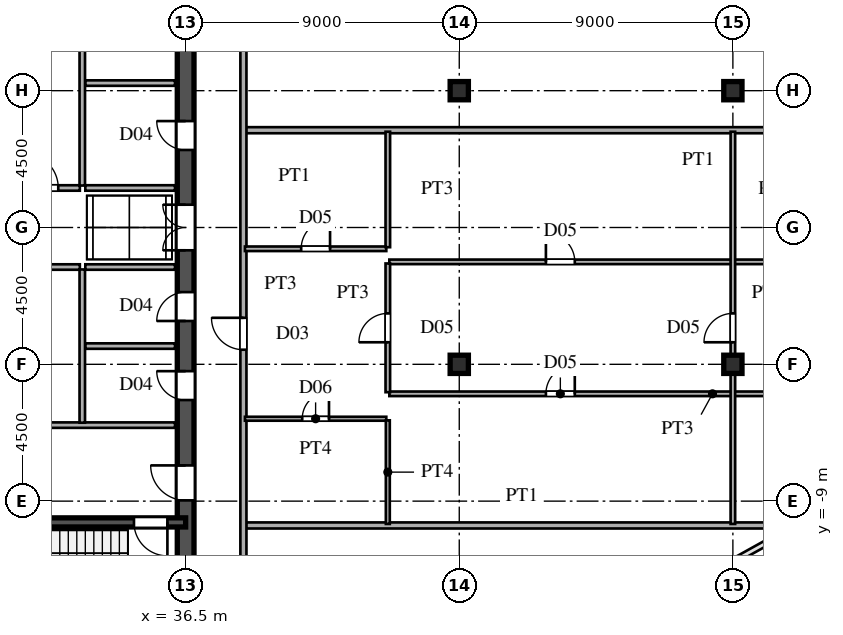
"""IFC4 building model, lengths in metres.
Left out: names, types, materials, properties, quantities, classifications, styles, units other than length and angle.
Written with IfcOpenShell. Run it as: python <this file> out.ifc"""

import sys

from ifc_helpers import new_model, si_unit, direction, frame, frame_2d, origin, origin_2d, place, context, subcontext, project, spatial, rectangle, i_section, extrude, source, transform, mapped, element, fill, save


model = new_model("IFC4")
c1 = context("Model", 3, precision=1e-05, world=origin(), true_north=direction((0.0, 1.0)))
c2 = subcontext(c1, "Body", "Model", "MODEL_VIEW")
j1 = project(units=[si_unit("LENGTHUNIT", "METRE"), si_unit("PLANEANGLEUNIT", "RADIAN")], contexts=[c1])
p1 = place(None, origin())
s1 = spatial("IfcSite", under=j1, at=p1, CompositionType="ELEMENT")
p2 = place(p1, origin())
s2 = spatial("IfcBuilding", under=s1, at=p2, CompositionType="ELEMENT")
p3 = place(p2, frame((0.0, 0.0, 192.3)))
s3 = spatial("IfcBuildingStorey", under=s2, at=p3, CompositionType="ELEMENT", Elevation=192.3)
m1 = source(origin(), c2, "Body", "SweptSolid", [
    extrude(i_section(OverallWidth=0.6, OverallDepth=0.6, WebThickness=0.025, FlangeThickness=0.04, at=origin_2d()), origin(), (0.0, 0.0, 1.0), 3.6),
])
for number, where, z_axis, x_axis in (
    (1, (45.5, -4.5, 0.0), (0.0, 0.0, 1.0), (1.0, 0.0, 0.0)),
    (2, (45.5, 4.5, 0.0), (0.0, 0.0, 1.0), (1.0, 0.0, 0.0)),
    (3, (54.5, -4.5, 0.0), (0.0, 0.0, 1.0), (1.0, 0.0, 0.0)),
    (4, (54.5, 4.5, 0.0), (0.0, 0.0, 1.0), (1.0, 0.0, 0.0)),
):
    element("IfcColumn", number, at=place(p3, frame(where, z_axis=z_axis, x_axis=x_axis)), inside=s3, PredefinedType="COLUMN", context=c2, shape_type="MappedRepresentation", body=[
        mapped(m1, transform((0.0, 0.0, 0.0), scale=1.0)),
    ])
p4 = place(p3, frame((36.5, -13.65, 0.0), z_axis=(0.0, 0.0, 1.0), x_axis=(0.0, 1.0, 0.0)))
e5 = element("IfcWall", 5, at=p4, inside=s3, PredefinedType="SHEAR", context=c2, shape_type="SweptSolid", body=[
    extrude(rectangle(XDim=7.15, YDim=0.55, at=frame_2d((3.575, 0.0))), origin(), (0.0, 0.0, 1.0), 3.38),
])
p5 = place(p4, frame((4.675, 0.0, 0.0)))
e6 = element("IfcOpeningElement", 6, at=p5, cuts=e5, PredefinedType="OPENING", context=c2, shape_type="SweptSolid", body=[
    extrude(rectangle(XDim=1.15, YDim=2.2, at=frame_2d((0.575, 1.1))), frame((0.0, 0.285, 0.0), z_axis=(0.0, -1.0, 0.0), x_axis=(1.0, 0.0, 0.0)), (0.0, 0.0, 1.0), 0.57),
])
p6 = place(p3, frame((36.5, -1.3, 0.0), z_axis=(0.0, 0.0, 1.0), x_axis=(0.0, 1.0, 0.0)))
e7 = element("IfcWall", 7, at=p6, inside=s3, PredefinedType="SHEAR", context=c2, shape_type="SweptSolid", body=[
    extrude(rectangle(XDim=2.6, YDim=0.55, at=frame_2d((1.3, 0.0))), origin(), (0.0, 0.0, 1.0), 3.38),
])
p7 = place(p6, frame((0.55, 0.0, 0.0)))
e8 = element("IfcOpeningElement", 8, at=p7, cuts=e7, PredefinedType="OPENING", context=c2, shape_type="SweptSolid", body=[
    extrude(rectangle(XDim=1.5, YDim=2.3, at=frame_2d((0.75, 1.15))), frame((0.0, 0.285, 0.0), z_axis=(0.0, -1.0, 0.0), x_axis=(1.0, 0.0, 0.0)), (0.0, 0.0, 1.0), 0.57),
])
p8 = place(p3, frame((36.5, -6.5, 0.0), z_axis=(0.0, 0.0, 1.0), x_axis=(0.0, 1.0, 0.0)))
e9 = element("IfcWall", 9, at=p8, inside=s3, PredefinedType="SHEAR", context=c2, shape_type="SweptSolid", body=[
    extrude(rectangle(XDim=2.6, YDim=0.55, at=frame_2d((1.3, 0.0))), origin(), (0.0, 0.0, 1.0), 3.38),
])
p9 = place(p8, frame((0.825, 0.0, 0.0)))
e10 = element("IfcOpeningElement", 10, at=p9, cuts=e9, PredefinedType="OPENING", context=c2, shape_type="SweptSolid", body=[
    extrude(rectangle(XDim=0.95, YDim=2.15, at=frame_2d((0.475, 1.075))), frame((0.0, 0.285, 0.0), z_axis=(0.0, -1.0, 0.0), x_axis=(1.0, 0.0, 0.0)), (0.0, 0.0, 1.0), 0.57),
])
p10 = place(p3, frame((36.5, -3.9, 0.0), z_axis=(0.0, 0.0, 1.0), x_axis=(0.0, 1.0, 0.0)))
e11 = element("IfcWall", 11, at=p10, inside=s3, PredefinedType="SHEAR", context=c2, shape_type="SweptSolid", body=[
    extrude(rectangle(XDim=2.6, YDim=0.55, at=frame_2d((1.3, 0.0))), origin(), (0.0, 0.0, 1.0), 3.38),
])
p11 = place(p10, frame((0.825, 0.0, 0.0)))
e12 = element("IfcOpeningElement", 12, at=p11, cuts=e11, PredefinedType="OPENING", context=c2, shape_type="SweptSolid", body=[
    extrude(rectangle(XDim=0.95, YDim=2.15, at=frame_2d((0.475, 1.075))), frame((0.0, 0.285, 0.0), z_axis=(0.0, -1.0, 0.0), x_axis=(1.0, 0.0, 0.0)), (0.0, 0.0, 1.0), 0.57),
])
p12 = place(p3, frame((36.5, 1.3, 0.0), z_axis=(0.0, 0.0, 1.0), x_axis=(0.0, 1.0, 0.0)))
e13 = element("IfcWall", 13, at=p12, inside=s3, PredefinedType="SHEAR", context=c2, shape_type="SweptSolid", body=[
    extrude(rectangle(XDim=3.45, YDim=0.55, at=frame_2d((1.725, 0.0))), origin(), (0.0, 0.0, 1.0), 3.38),
])
p13 = place(p12, frame((1.25, 0.0, 0.0)))
e14 = element("IfcOpeningElement", 14, at=p13, cuts=e13, PredefinedType="OPENING", context=c2, shape_type="SweptSolid", body=[
    extrude(rectangle(XDim=0.95, YDim=2.15, at=frame_2d((0.475, 1.075))), frame((0.0, 0.285, 0.0), z_axis=(0.0, -1.0, 0.0), x_axis=(1.0, 0.0, 0.0)), (0.0, 0.0, 1.0), 0.57),
])
p14 = place(p3, frame((36.5, 4.75, 0.0), z_axis=(0.0, 0.0, 1.0), x_axis=(0.0, 1.0, 0.0)))
e15 = element("IfcWall", 15, at=p14, inside=s3, PredefinedType="SHEAR", context=c2, shape_type="SweptSolid", body=[
    extrude(rectangle(XDim=3.45, YDim=0.55, at=frame_2d((1.725, 0.0))), origin(), (0.0, 0.0, 1.0), 3.38),
])
p15 = place(p14, frame((1.25, 0.0, 0.0)))
e16 = element("IfcOpeningElement", 16, at=p15, cuts=e15, PredefinedType="OPENING", context=c2, shape_type="SweptSolid", body=[
    extrude(rectangle(XDim=0.95, YDim=2.15, at=frame_2d((0.475, 1.075))), frame((0.0, 0.285, 0.0), z_axis=(0.0, -1.0, 0.0), x_axis=(1.0, 0.0, 0.0)), (0.0, 0.0, 1.0), 0.57),
])
p16 = place(p3, frame((27.5, -9.7, 0.0), z_axis=(0.0, 0.0, 1.0), x_axis=(1.0, 0.0, 0.0)))
e17 = element("IfcWall", 17, at=p16, inside=s3, PredefinedType="SHEAR", context=c2, shape_type="SweptSolid", body=[
    extrude(rectangle(XDim=9.0, YDim=0.3, at=frame_2d((4.5, 0.0))), origin(), (0.0, 0.0, 1.0), 3.38),
])
p17 = place(p16, frame((7.3, 0.0, 0.0)))
e18 = element("IfcOpeningElement", 18, at=p17, cuts=e17, PredefinedType="OPENING", context=c2, shape_type="SweptSolid", body=[
    extrude(rectangle(XDim=1.1, YDim=2.2, at=frame_2d((0.55, 1.1))), frame((0.0, 0.16, 0.0), z_axis=(0.0, -1.0, 0.0), x_axis=(1.0, 0.0, 0.0)), (0.0, 0.0, 1.0), 0.32),
])
p18 = place(p3, frame((30.45, -6.5, 0.0), z_axis=(0.0, 0.0, 1.0), x_axis=(1.0, 0.0, 0.0)))
e19 = element("IfcWall", 19, at=p18, inside=s3, PredefinedType="PARTITIONING", context=c2, shape_type="SweptSolid", body=[
    extrude(rectangle(XDim=5.7, YDim=0.18, at=frame_2d((2.85, 0.0))), origin(), (0.0, 0.0, 1.0), 3.38),
])
p19 = place(p3, frame((33.1, -6.42, 0.0), z_axis=(0.0, 0.0, 1.0), x_axis=(0.0, 1.0, 0.0)))
e20 = element("IfcWall", 20, at=p19, inside=s3, PredefinedType="PARTITIONING", context=c2, shape_type="SweptSolid", body=[
    extrude(rectangle(XDim=5.04, YDim=0.18, at=frame_2d((2.52, 0.0))), origin(), (0.0, 0.0, 1.0), 3.38),
])
p20 = place(p3, frame((33.1, 1.38, 0.0), z_axis=(0.0, 0.0, 1.0), x_axis=(0.0, 1.0, 0.0)))
e21 = element("IfcWall", 21, at=p20, inside=s3, PredefinedType="PARTITIONING", context=c2, shape_type="SweptSolid", body=[
    extrude(rectangle(XDim=6.74, YDim=0.18, at=frame_2d((3.37, 0.0))), origin(), (0.0, 0.0, 1.0), 3.38),
])
p21 = place(p3, frame((30.3, -1.3, 0.0), z_axis=(0.0, 0.0, 1.0), x_axis=(1.0, 0.0, 0.0)))
e22 = element("IfcWall", 22, at=p21, inside=s3, PredefinedType="PARTITIONING", context=c2, shape_type="SweptSolid", body=[
    extrude(rectangle(XDim=2.72, YDim=0.18, at=frame_2d((1.36, 0.0))), origin(), (0.0, 0.0, 1.0), 3.38),
])
p22 = place(p21, frame((0.21, 0.0, 0.0)))
e23 = element("IfcOpeningElement", 23, at=p22, cuts=e22, PredefinedType="OPENING", context=c2, shape_type="SweptSolid", body=[
    extrude(rectangle(XDim=1.15, YDim=2.2, at=frame_2d((0.575, 1.1))), frame((0.0, 0.1, 0.0), z_axis=(0.0, -1.0, 0.0), x_axis=(1.0, 0.0, 0.0)), (0.0, 0.0, 1.0), 0.2),
])
p23 = place(p3, frame((30.45, 1.3, 0.0), z_axis=(0.0, 0.0, 1.0), x_axis=(1.0, 0.0, 0.0)))
e24 = element("IfcWall", 24, at=p23, inside=s3, PredefinedType="PARTITIONING", context=c2, shape_type="SweptSolid", body=[
    extrude(rectangle(XDim=2.57, YDim=0.18, at=frame_2d((1.285, 0.0))), origin(), (0.0, 0.0, 1.0), 3.38),
])
p24 = place(p23, frame((0.71, 0.0, 0.0)))
e25 = element("IfcOpeningElement", 25, at=p24, cuts=e24, PredefinedType="OPENING", context=c2, shape_type="SweptSolid", body=[
    extrude(rectangle(XDim=1.15, YDim=2.2, at=frame_2d((0.575, 1.1))), frame((0.0, 0.1, 0.0), z_axis=(0.0, -1.0, 0.0), x_axis=(1.0, 0.0, 0.0)), (0.0, 0.0, 1.0), 0.2),
])
for number, where, z_axis, x_axis in (
    (26, (33.2, -1.3, 0.0), (0.0, 0.0, 1.0), (1.0, 0.0, 0.0)),
    (27, (33.2, 1.3, 0.0), (0.0, 0.0, 1.0), (1.0, 0.0, 0.0)),
    (28, (33.2, -3.9, 0.0), (0.0, 0.0, 1.0), (1.0, 0.0, 0.0)),
    (29, (33.2, 4.75, 0.0), (0.0, 0.0, 1.0), (1.0, 0.0, 0.0)),
):
    element("IfcWall", number, at=place(p3, frame(where, z_axis=z_axis, x_axis=x_axis)), inside=s3, PredefinedType="PARTITIONING", context=c2, shape_type="SweptSolid", body=[
        extrude(rectangle(XDim=2.95, YDim=0.18, at=frame_2d((1.475, 0.0))), origin(), (0.0, 0.0, 1.0), 3.38),
    ])
p25 = place(p3, frame((38.48, -9.8, 0.0), z_axis=(0.0, 0.0, 1.0), x_axis=(1.0, 0.0, 0.0)))
e30 = element("IfcWall", 30, at=p25, inside=s3, PredefinedType="PARTITIONING", context=c2, shape_type="SweptSolid", body=[
    extrude(rectangle(XDim=18.163, YDim=0.2, at=frame_2d((9.082, 0.0))), origin(), (0.0, 0.0, 1.0), 3.38),
])
p26 = place(p3, frame((38.45, -6.29, 0.0), z_axis=(0.0, 0.0, 1.0), x_axis=(1.0, 0.0, 0.0)))
e31 = element("IfcWall", 31, at=p26, inside=s3, PredefinedType="PARTITIONING", context=c2, shape_type="SweptSolid", body=[
    extrude(rectangle(XDim=4.65, YDim=0.13, at=frame_2d((2.325, 0.0))), origin(), (0.0, 0.0, 1.0), 3.38),
])
p27 = place(p26, frame((1.885, 0.0, 0.0)))
e32 = element("IfcOpeningElement", 32, at=p27, cuts=e31, PredefinedType="OPENING", context=c2, shape_type="SweptSolid", body=[
    extrude(rectangle(XDim=0.88, YDim=2.1, at=frame_2d((0.44, 1.05))), frame((0.0, 0.075, 0.0), z_axis=(0.0, -1.0, 0.0), x_axis=(1.0, 0.0, 0.0)), (0.0, 0.0, 1.0), 0.15),
])
p28 = place(p3, frame((43.2, -5.47, 0.0), z_axis=(0.0, 0.0, 1.0), x_axis=(1.0, 0.0, 0.0)))
e33 = element("IfcWall", 33, at=p28, inside=s3, PredefinedType="PARTITIONING", context=c2, shape_type="SweptSolid", body=[
    extrude(rectangle(XDim=21.259, YDim=0.15, at=frame_2d((10.629, 0.0))), origin(), (0.0, 0.0, 1.0), 3.38),
])
p29 = place(p28, frame((5.15, 0.0, 0.0)))
e34 = element("IfcOpeningElement", 34, at=p29, cuts=e33, PredefinedType="OPENING", context=c2, shape_type="SweptSolid", body=[
    extrude(rectangle(XDim=0.95, YDim=2.15, at=frame_2d((0.475, 1.075))), frame((0.0, 0.085, 0.0), z_axis=(0.0, -1.0, 0.0), x_axis=(1.0, 0.0, 0.0)), (0.0, 0.0, 1.0), 0.17),
])
p30 = place(p28, frame((14.113, 0.0, 0.0)))
e35 = element("IfcOpeningElement", 35, at=p30, cuts=e33, PredefinedType="OPENING", context=c2, shape_type="SweptSolid", body=[
    extrude(rectangle(XDim=0.95, YDim=2.15, at=frame_2d((0.475, 1.075))), frame((0.0, 0.085, 0.0), z_axis=(0.0, -1.0, 0.0), x_axis=(1.0, 0.0, 0.0)), (0.0, 0.0, 1.0), 0.17),
])
p31 = place(p3, frame((43.2, -1.13, 0.0), z_axis=(0.0, 0.0, 1.0), x_axis=(1.0, 0.0, 0.0)))
e36 = element("IfcWall", 36, at=p31, inside=s3, PredefinedType="PARTITIONING", context=c2, shape_type="SweptSolid", body=[
    extrude(rectangle(XDim=25.335, YDim=0.15, at=frame_2d((12.667, 0.0))), origin(), (0.0, 0.0, 1.0), 3.38),
])
p32 = place(p31, frame((5.15, 0.0, 0.0)))
e37 = element("IfcOpeningElement", 37, at=p32, cuts=e36, PredefinedType="OPENING", context=c2, shape_type="SweptSolid", body=[
    extrude(rectangle(XDim=0.95, YDim=2.15, at=frame_2d((0.475, 1.075))), frame((0.0, 0.085, 0.0), z_axis=(0.0, -1.0, 0.0), x_axis=(1.0, 0.0, 0.0)), (0.0, 0.0, 1.0), 0.17),
])
p33 = place(p31, frame((20.675, 0.0, 0.0)))
e38 = element("IfcOpeningElement", 38, at=p33, cuts=e36, PredefinedType="OPENING", context=c2, shape_type="SweptSolid", body=[
    extrude(rectangle(XDim=0.95, YDim=2.15, at=frame_2d((0.475, 1.075))), frame((0.0, 0.085, 0.0), z_axis=(0.0, -1.0, 0.0), x_axis=(1.0, 0.0, 0.0)), (0.0, 0.0, 1.0), 0.17),
])
p34 = place(p31, frame((13.675, 0.0, 0.0)))
e39 = element("IfcOpeningElement", 39, at=p34, cuts=e36, PredefinedType="OPENING", context=c2, shape_type="SweptSolid", body=[
    extrude(rectangle(XDim=0.95, YDim=2.15, at=frame_2d((0.475, 1.075))), frame((0.0, 0.085, 0.0), z_axis=(0.0, -1.0, 0.0), x_axis=(1.0, 0.0, 0.0)), (0.0, 0.0, 1.0), 0.17),
])
p35 = place(p3, frame((38.45, -0.7, 0.0), z_axis=(0.0, 0.0, 1.0), x_axis=(1.0, 0.0, 0.0)))
e40 = element("IfcWall", 40, at=p35, inside=s3, PredefinedType="PARTITIONING", context=c2, shape_type="SweptSolid", body=[
    extrude(rectangle(XDim=4.65, YDim=0.15, at=frame_2d((2.325, 0.0))), origin(), (0.0, 0.0, 1.0), 3.38),
])
p36 = place(p35, frame((1.85, 0.0, 0.0)))
e41 = element("IfcOpeningElement", 41, at=p36, cuts=e40, PredefinedType="OPENING", context=c2, shape_type="SweptSolid", body=[
    extrude(rectangle(XDim=0.95, YDim=2.15, at=frame_2d((0.475, 1.075))), frame((0.0, 0.085, 0.0), z_axis=(0.0, -1.0, 0.0), x_axis=(1.0, 0.0, 0.0)), (0.0, 0.0, 1.0), 0.17),
])
p37 = place(p3, frame((38.48, 3.2, 0.0), z_axis=(0.0, 0.0, 1.0), x_axis=(1.0, 0.0, 0.0)))
e42 = element("IfcWall", 42, at=p37, inside=s3, PredefinedType="PARTITIONING", context=c2, shape_type="SweptSolid", body=[
    extrude(rectangle(XDim=29.763, YDim=0.2, at=frame_2d((14.881, 0.0))), origin(), (0.0, 0.0, 1.0), 3.38),
])
p38 = place(p3, frame((38.4, -15.715, 0.0), z_axis=(0.0, 0.0, 1.0), x_axis=(0.0, 1.0, 0.0)))
e43 = element("IfcWall", 43, at=p38, inside=s3, PredefinedType="PARTITIONING", context=c2, shape_type="SweptSolid", body=[
    extrude(rectangle(XDim=31.43, YDim=0.2, at=frame_2d((15.715, 0.0))), origin(), (0.0, 0.0, 1.0), 3.38),
])
p39 = place(p38, frame((2.39, 0.0, 0.0)))
e44 = element("IfcOpeningElement", 44, at=p39, cuts=e43, PredefinedType="OPENING", context=c2, shape_type="SweptSolid", body=[
    extrude(rectangle(XDim=1.05, YDim=2.25, at=frame_2d((0.525, 1.125))), frame((0.0, 0.11, 0.0), z_axis=(0.0, -1.0, 0.0), x_axis=(1.0, 0.0, 0.0)), (0.0, 0.0, 1.0), 0.22),
])
p40 = place(p38, frame((11.695, 0.0, 0.0)))
e45 = element("IfcOpeningElement", 45, at=p40, cuts=e43, PredefinedType="OPENING", context=c2, shape_type="SweptSolid", body=[
    extrude(rectangle(XDim=1.05, YDim=2.25, at=frame_2d((0.525, 1.125))), frame((0.0, 0.11, 0.0), z_axis=(0.0, -1.0, 0.0), x_axis=(1.0, 0.0, 0.0)), (0.0, 0.0, 1.0), 0.22),
])
p41 = place(p38, frame((24.69, 0.0, 0.0)))
e46 = element("IfcOpeningElement", 46, at=p41, cuts=e43, PredefinedType="OPENING", context=c2, shape_type="SweptSolid", body=[
    extrude(rectangle(XDim=1.05, YDim=2.25, at=frame_2d((0.525, 1.125))), frame((0.0, 0.11, 0.0), z_axis=(0.0, -1.0, 0.0), x_axis=(1.0, 0.0, 0.0)), (0.0, 0.0, 1.0), 0.22),
])
p42 = place(p3, frame((43.15, -9.75, 0.0), z_axis=(0.0, 0.0, 1.0), x_axis=(0.0, 1.0, 0.0)))
e47 = element("IfcWall", 47, at=p42, inside=s3, PredefinedType="PARTITIONING", context=c2, shape_type="SweptSolid", body=[
    extrude(rectangle(XDim=3.408, YDim=0.13, at=frame_2d((1.704, 0.0))), origin(), (0.0, 0.0, 1.0), 3.38),
])
p43 = place(p3, frame((43.15, -5.417, 0.0), z_axis=(0.0, 0.0, 1.0), x_axis=(0.0, 1.0, 0.0)))
e48 = element("IfcWall", 48, at=p43, inside=s3, PredefinedType="PARTITIONING", context=c2, shape_type="SweptSolid", body=[
    extrude(rectangle(XDim=4.234, YDim=0.15, at=frame_2d((2.117, 0.0))), origin(), (0.0, 0.0, 1.0), 2.99),
])
p44 = place(p43, frame((1.642, 0.0, 0.0)))
e49 = element("IfcOpeningElement", 49, at=p44, cuts=e48, PredefinedType="OPENING", context=c2, shape_type="SweptSolid", body=[
    extrude(rectangle(XDim=0.95, YDim=2.15, at=frame_2d((0.475, 1.075))), frame((0.0, 0.085, 0.0), z_axis=(0.0, -1.0, 0.0), x_axis=(1.0, 0.0, 0.0)), (0.0, 0.0, 1.0), 0.17),
])
p45 = place(p3, frame((43.15, -0.648, 0.0), z_axis=(0.0, 0.0, 1.0), x_axis=(0.0, 1.0, 0.0)))
e50 = element("IfcWall", 50, at=p45, inside=s3, PredefinedType="PARTITIONING", context=c2, shape_type="SweptSolid", body=[
    extrude(rectangle(XDim=3.798, YDim=0.15, at=frame_2d((1.899, 0.0))), origin(), (0.0, 0.0, 1.0), 3.38),
])
p46 = place(p3, frame((54.5, -9.75, 0.0), z_axis=(0.0, 0.0, 1.0), x_axis=(0.0, 1.0, 0.0)))
e51 = element("IfcWall", 51, at=p46, inside=s3, PredefinedType="PARTITIONING", context=c2, shape_type="SweptSolid", body=[
    extrude(rectangle(XDim=12.9, YDim=0.15, at=frame_2d((6.45, 0.0))), origin(), (0.0, 0.0, 1.0), 2.78),
])
p47 = place(p46, frame((5.975, 0.0, 0.0)))
e52 = element("IfcOpeningElement", 52, at=p47, cuts=e51, PredefinedType="OPENING", context=c2, shape_type="SweptSolid", body=[
    extrude(rectangle(XDim=0.95, YDim=2.15, at=frame_2d((0.475, 1.075))), frame((0.0, 0.085, 0.0), z_axis=(0.0, -1.0, 0.0), x_axis=(1.0, 0.0, 0.0)), (0.0, 0.0, 1.0), 0.17),
])
m2 = source(origin(), c2, "Body", "SweptSolid", [
    extrude(rectangle(XDim=1.15, YDim=2.2, at=frame_2d((0.575, 1.1))), frame((0.0, 0.025, 0.0), z_axis=(0.0, -1.0, 0.0), x_axis=(1.0, 0.0, 0.0)), (0.0, 0.0, 1.0), 0.05),
])
p48 = place(p5, origin())
e53 = element("IfcDoor", 53, at=p48, inside=s3, OperationType="SINGLE_SWING_RIGHT", PredefinedType="DOOR", context=c2, shape_type="MappedRepresentation", body=[
    mapped(m2, transform((0.0, 0.0, 0.0), scale=1.0)),
])
fill(e6, e53)
m3 = source(origin(), c2, "Body", "SweptSolid", [
    extrude(rectangle(XDim=1.5, YDim=2.3, at=frame_2d((0.75, 1.15))), frame((0.0, 0.025, 0.0), z_axis=(0.0, -1.0, 0.0), x_axis=(1.0, 0.0, 0.0)), (0.0, 0.0, 1.0), 0.05),
])
p49 = place(p7, origin())
e54 = element("IfcDoor", 54, at=p49, inside=s3, OperationType="DOUBLE_SWING_LEFT", PredefinedType="DOOR", context=c2, shape_type="MappedRepresentation", body=[
    mapped(m3, transform((0.0, 0.0, 0.0), scale=1.0)),
])
fill(e8, e54)
m4 = source(origin(), c2, "Body", "SweptSolid", [
    extrude(rectangle(XDim=0.95, YDim=2.15, at=frame_2d((0.475, 1.075))), frame((0.0, 0.025, 0.0), z_axis=(0.0, -1.0, 0.0), x_axis=(1.0, 0.0, 0.0)), (0.0, 0.0, 1.0), 0.05),
])
p50 = place(p9, origin())
e55 = element("IfcDoor", 55, at=p50, inside=s3, OperationType="SINGLE_SWING_RIGHT", PredefinedType="DOOR", context=c2, shape_type="MappedRepresentation", body=[
    mapped(m4, transform((0.0, 0.0, 0.0), scale=1.0)),
])
fill(e10, e55)
p51 = place(p11, origin())
e56 = element("IfcDoor", 56, at=p51, inside=s3, OperationType="SINGLE_SWING_LEFT", PredefinedType="DOOR", context=c2, shape_type="MappedRepresentation", body=[
    mapped(m4, transform((0.0, 0.0, 0.0), scale=1.0)),
])
fill(e12, e56)
p52 = place(p13, origin())
e57 = element("IfcDoor", 57, at=p52, inside=s3, OperationType="SINGLE_SWING_RIGHT", PredefinedType="DOOR", context=c2, shape_type="MappedRepresentation", body=[
    mapped(m4, transform((0.0, 0.0, 0.0), scale=1.0)),
])
fill(e14, e57)
m5 = source(origin(), c2, "Body", "SweptSolid", [
    extrude(rectangle(XDim=1.1, YDim=2.2, at=frame_2d((0.55, 1.1))), frame((0.0, 0.025, 0.0), z_axis=(0.0, -1.0, 0.0), x_axis=(1.0, 0.0, 0.0)), (0.0, 0.0, 1.0), 0.05),
])
p53 = place(p17, frame((1.1, 0.0, 0.0), z_axis=(0.0, 0.0, 1.0), x_axis=(-1.0, 0.0, 0.0)))
e58 = element("IfcDoor", 58, at=p53, inside=s3, OperationType="SINGLE_SWING_RIGHT", PredefinedType="DOOR", context=c2, shape_type="MappedRepresentation", body=[
    mapped(m5, transform((0.0, 0.0, 0.0), scale=1.0)),
])
fill(e18, e58)
p54 = place(p24, origin())
e59 = element("IfcDoor", 59, at=p54, inside=s3, OperationType="SINGLE_SWING_LEFT", PredefinedType="DOOR", context=c2, shape_type="MappedRepresentation", body=[
    mapped(m2, transform((0.0, 0.0, 0.0), scale=1.0)),
])
fill(e25, e59)
m6 = source(origin(), c2, "Body", "SweptSolid", [
    extrude(rectangle(XDim=0.88, YDim=2.1, at=frame_2d((0.44, 1.05))), frame((0.0, 0.025, 0.0), z_axis=(0.0, -1.0, 0.0), x_axis=(1.0, 0.0, 0.0)), (0.0, 0.0, 1.0), 0.05),
])
p55 = place(p27, origin())
e60 = element("IfcDoor", 60, at=p55, inside=s3, OperationType="SINGLE_SWING_RIGHT", PredefinedType="DOOR", context=c2, shape_type="MappedRepresentation", body=[
    mapped(m6, transform((0.0, 0.0, 0.0), scale=1.0)),
])
fill(e32, e60)
m7 = source(origin(), c2, "Body", "SweptSolid", [
    extrude(rectangle(XDim=0.95, YDim=2.15, at=frame_2d((0.475, 1.075))), frame((0.0, 0.025, 0.0), z_axis=(0.0, -1.0, 0.0), x_axis=(1.0, 0.0, 0.0)), (0.0, 0.0, 1.0), 0.05),
])
p56 = place(p29, origin())
e61 = element("IfcDoor", 61, at=p56, inside=s3, OperationType="SINGLE_SWING_RIGHT", PredefinedType="DOOR", context=c2, shape_type="MappedRepresentation", body=[
    mapped(m7, transform((0.0, 0.0, 0.0), scale=1.0)),
])
fill(e34, e61)
p57 = place(p32, origin())
e62 = element("IfcDoor", 62, at=p57, inside=s3, OperationType="SINGLE_SWING_LEFT", PredefinedType="DOOR", context=c2, shape_type="MappedRepresentation", body=[
    mapped(m7, transform((0.0, 0.0, 0.0), scale=1.0)),
])
fill(e37, e62)
p58 = place(p36, origin())
e63 = element("IfcDoor", 63, at=p58, inside=s3, OperationType="SINGLE_SWING_RIGHT", PredefinedType="DOOR", context=c2, shape_type="MappedRepresentation", body=[
    mapped(m7, transform((0.0, 0.0, 0.0), scale=1.0)),
])
fill(e41, e63)
m8 = source(origin(), c2, "Body", "SweptSolid", [
    extrude(rectangle(XDim=1.05, YDim=2.25, at=frame_2d((0.525, 1.125))), frame((0.0, 0.025, 0.0), z_axis=(0.0, -1.0, 0.0), x_axis=(1.0, 0.0, 0.0)), (0.0, 0.0, 1.0), 0.05),
])
p59 = place(p40, origin())
e64 = element("IfcDoor", 64, at=p59, inside=s3, OperationType="SINGLE_SWING_RIGHT", PredefinedType="DOOR", context=c2, shape_type="MappedRepresentation", body=[
    mapped(m8, transform((0.0, 0.0, 0.0), scale=1.0)),
])
fill(e45, e64)
p60 = place(p44, origin())
e65 = element("IfcDoor", 65, at=p60, inside=s3, OperationType="SINGLE_SWING_LEFT", PredefinedType="DOOR", context=c2, shape_type="MappedRepresentation", body=[
    mapped(m7, transform((0.0, 0.0, 0.0), scale=1.0)),
])
fill(e49, e65)
p61 = place(p47, origin())
e66 = element("IfcDoor", 66, at=p61, inside=s3, OperationType="SINGLE_SWING_LEFT", PredefinedType="DOOR", context=c2, shape_type="MappedRepresentation", body=[
    mapped(m7, transform((0.0, 0.0, 0.0), scale=1.0)),
])
fill(e52, e66)
save(model, sys.argv[1])
